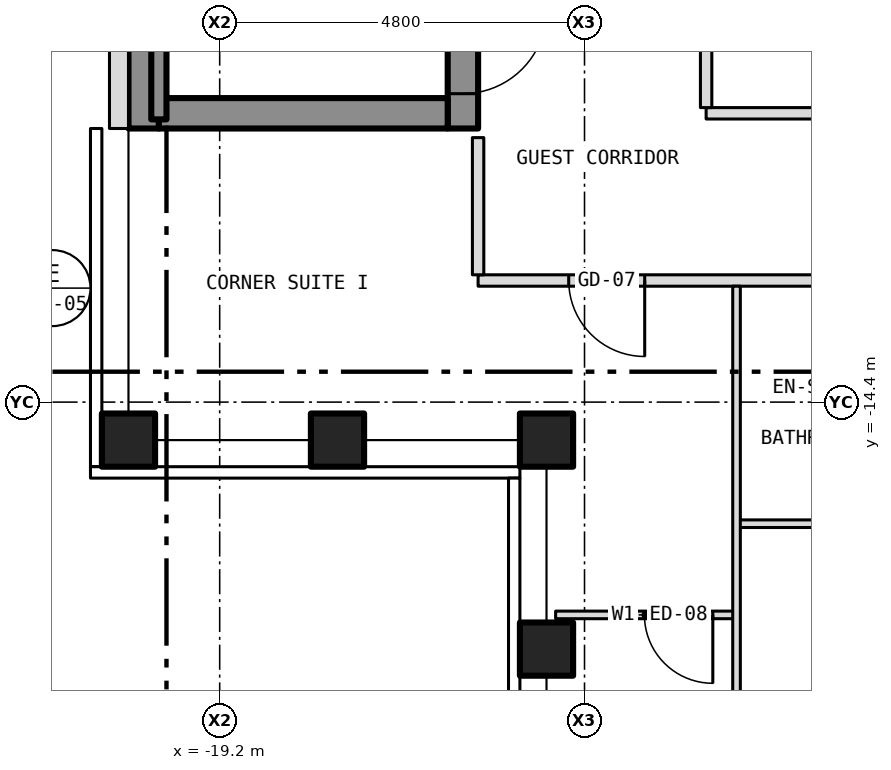
"""IFC4 building model, lengths in metres.
Left out: names, types, materials, properties, quantities, classifications, styles, units other than length and angle.
Written with IfcOpenShell. Run it as: python <this file> out.ifc"""

import sys

from ifc_helpers import new_model, si_unit, direction, frame, frame_2d, origin, origin_2d, place, context, subcontext, project, spatial, rectangle, hollow_rectangle, extrude, element, fill, save


model = new_model("IFC4")
c1 = context("Model", 3, precision=1e-05, world=origin(), true_north=direction((0.0, 1.0)))
c2 = subcontext(c1, "Body", "Model", "MODEL_VIEW")
j1 = project(units=[si_unit("LENGTHUNIT", "METRE"), si_unit("PLANEANGLEUNIT", "RADIAN")], contexts=[c1])
p1 = place(None, origin())
s1 = spatial("IfcSite", under=j1, at=p1, CompositionType="ELEMENT")
p2 = place(p1, origin())
s2 = spatial("IfcBuilding", under=s1, at=p2, CompositionType="ELEMENT")
p3 = place(p2, frame((0.0, 0.0, 215.5)))
s3 = spatial("IfcBuildingStorey", under=s2, at=p3, CompositionType="ELEMENT", Elevation=215.5)
for number, where, z_axis, x_axis in (
    (1, (-20.4, -14.9, -0.15), (0.0, 0.0, 1.0), (1.0, 0.0, 0.0)),
    (2, (-14.9, -14.9, -0.15), (0.0, 0.0, 1.0), (1.0, 0.0, 0.0)),
    (3, (-14.9, -17.65, -0.15), (0.0, 0.0, 1.0), (1.0, 0.0, 0.0)),
    (4, (-17.65, -14.9, -0.15), (0.0, 0.0, 1.0), (1.0, 0.0, 0.0)),
):
    element("IfcColumn", number, at=place(p3, frame(where, z_axis=z_axis, x_axis=x_axis)), inside=s3, PredefinedType="COLUMN", context=c2, shape_type="SweptSolid", body=[
        extrude(hollow_rectangle(XDim=0.7, YDim=0.7, WallThickness=0.04, at=origin_2d()), origin(), (0.0, 0.0, 1.0), 3.5),
    ])
p4 = place(p3, frame((-16.0, -10.8, 0.0), z_axis=(0.0, 0.0, 1.0), x_axis=(0.0, 1.0, 0.0)))
e5 = element("IfcWall", 5, at=p4, inside=s3, PredefinedType="SHEAR", context=c2, shape_type="SweptSolid", body=[
    extrude(rectangle(XDim=21.6, YDim=0.4, at=frame_2d((10.8, 0.0))), origin(), (0.0, 0.0, 1.0), 3.25),
])
p5 = place(p4, frame((9.4, 0.0, 0.0)))
e6 = element("IfcOpeningElement", 6, at=p5, cuts=e5, PredefinedType="OPENING", context=c2, shape_type="SweptSolid", body=[
    extrude(rectangle(XDim=1.1, YDim=2.1, at=frame_2d((0.55, 1.05))), frame((0.0, 0.212, 0.0), z_axis=(0.0, -1.0, 0.0), x_axis=(1.0, 0.0, 0.0)), (0.0, 0.0, 1.0), 0.424),
])
p6 = place(p4, frame((11.5, 0.0, 0.0)))
e7 = element("IfcOpeningElement", 7, at=p6, cuts=e5, PredefinedType="OPENING", context=c2, shape_type="SweptSolid", body=[
    extrude(rectangle(XDim=1.1, YDim=2.1, at=frame_2d((0.55, 1.05))), frame((0.0, 0.212, 0.0), z_axis=(0.0, -1.0, 0.0), x_axis=(1.0, 0.0, 0.0)), (0.0, 0.0, 1.0), 0.424),
])
p7 = place(p4, frame((13.6, 0.0, 0.0)))
e8 = element("IfcOpeningElement", 8, at=p7, cuts=e5, PredefinedType="OPENING", context=c2, shape_type="SweptSolid", body=[
    extrude(rectangle(XDim=1.1, YDim=2.1, at=frame_2d((0.55, 1.05))), frame((0.0, 0.212, 0.0), z_axis=(0.0, -1.0, 0.0), x_axis=(1.0, 0.0, 0.0)), (0.0, 0.0, 1.0), 0.424),
])
p8 = place(p4, frame((15.7, 0.0, 0.0)))
e9 = element("IfcOpeningElement", 9, at=p8, cuts=e5, PredefinedType="OPENING", context=c2, shape_type="SweptSolid", body=[
    extrude(rectangle(XDim=1.1, YDim=2.1, at=frame_2d((0.55, 1.05))), frame((0.0, 0.212, 0.0), z_axis=(0.0, -1.0, 0.0), x_axis=(1.0, 0.0, 0.0)), (0.0, 0.0, 1.0), 0.424),
])
p9 = place(p4, frame((17.8, 0.0, 0.0)))
e10 = element("IfcOpeningElement", 10, at=p9, cuts=e5, PredefinedType="OPENING", context=c2, shape_type="SweptSolid", body=[
    extrude(rectangle(XDim=1.1, YDim=2.1, at=frame_2d((0.55, 1.05))), frame((0.0, 0.212, 0.0), z_axis=(0.0, -1.0, 0.0), x_axis=(1.0, 0.0, 0.0)), (0.0, 0.0, 1.0), 0.424),
])
p10 = place(p4, frame((0.458, 0.0, 0.0)))
e11 = element("IfcOpeningElement", 11, at=p10, cuts=e5, PredefinedType="OPENING", context=c2, shape_type="SweptSolid", body=[
    extrude(rectangle(XDim=1.1, YDim=2.1, at=frame_2d((0.55, 1.05))), frame((0.0, 0.212, 0.0), z_axis=(0.0, -1.0, 0.0), x_axis=(1.0, 0.0, 0.0)), (0.0, 0.0, 1.0), 0.424),
])
p11 = place(p4, frame((7.5, 0.0, 0.0)))
e12 = element("IfcOpeningElement", 12, at=p11, cuts=e5, PredefinedType="OPENING", context=c2, shape_type="SweptSolid", body=[
    extrude(rectangle(XDim=1.1, YDim=2.1, at=frame_2d((0.55, 1.05))), frame((0.0, 0.212, 0.0), z_axis=(0.0, -1.0, 0.0), x_axis=(1.0, 0.0, 0.0)), (0.0, 0.0, 1.0), 0.424),
])
p12 = place(p4, frame((20.0, 0.0, 0.0)))
e13 = element("IfcOpeningElement", 13, at=p12, cuts=e5, PredefinedType="OPENING", context=c2, shape_type="SweptSolid", body=[
    extrude(rectangle(XDim=0.9, YDim=2.1, at=frame_2d((0.45, 1.05))), frame((0.0, 0.212, 0.0), z_axis=(0.0, -1.0, 0.0), x_axis=(1.0, 0.0, 0.0)), (0.0, 0.0, 1.0), 0.424),
])
p13 = place(p3, frame((-20.2, -10.8, 0.0), z_axis=(0.0, 0.0, 1.0), x_axis=(0.0, 1.0, 0.0)))
e14 = element("IfcWall", 14, at=p13, inside=s3, PredefinedType="SHEAR", context=c2, shape_type="SweptSolid", body=[
    extrude(rectangle(XDim=21.6, YDim=0.4, at=frame_2d((10.8, 0.0))), origin(), (0.0, 0.0, 1.0), 3.25),
])
p14 = place(p3, frame((-20.0, -10.6, 0.0), z_axis=(0.0, 0.0, 1.0), x_axis=(1.0, 0.0, 0.0)))
e15 = element("IfcWall", 15, at=p14, inside=s3, PredefinedType="SHEAR", context=c2, shape_type="SweptSolid", body=[
    extrude(rectangle(XDim=3.8, YDim=0.4, at=frame_2d((1.9, 0.0))), origin(), (0.0, 0.0, 1.0), 3.25),
])
p15 = place(p3, frame((-20.525, 10.8, 0.0), z_axis=(0.0, 0.0, 1.0), x_axis=(0.0, -1.0, 0.0)))
e16 = element("IfcWall", 16, at=p15, inside=s3, PredefinedType="SOLIDWALL", context=c2, shape_type="SweptSolid", body=[
    extrude(rectangle(XDim=21.6, YDim=0.25, at=frame_2d((10.8, 0.0))), origin(), (0.0, 0.0, 1.0), 3.5),
])
p16 = place(p15, frame((18.05, 0.0, 1.0)))
e17 = element("IfcOpeningElement", 17, at=p16, cuts=e16, PredefinedType="OPENING", context=c2, shape_type="SweptSolid", body=[
    extrude(rectangle(XDim=0.6, YDim=1.5, at=frame_2d((0.3, 0.75))), frame((0.0, 0.137, 0.0), z_axis=(0.0, -1.0, 0.0), x_axis=(1.0, 0.0, 0.0)), (0.0, 0.0, 1.0), 0.274),
])
p17 = place(p3, frame((-14.78, -17.2, 0.0), z_axis=(0.0, 0.0, 1.0), x_axis=(1.0, 0.0, 0.0)))
e18 = element("IfcWall", 18, at=p17, inside=s3, PredefinedType="PARTITIONING", context=c2, shape_type="SweptSolid", body=[
    extrude(rectangle(XDim=2.38, YDim=0.1, at=frame_2d((1.19, 0.0))), origin(), (0.0, 0.0, 1.0), 3.35),
])
p18 = place(p17, frame((1.168, 0.0, 0.0)))
e19 = element("IfcOpeningElement", 19, at=p18, cuts=e18, PredefinedType="OPENING", context=c2, shape_type="SweptSolid", body=[
    extrude(rectangle(XDim=0.9, YDim=2.1, at=frame_2d((0.45, 1.05))), frame((0.0, 0.062, 0.0), z_axis=(0.0, -1.0, 0.0), x_axis=(1.0, 0.0, 0.0)), (0.0, 0.0, 1.0), 0.124),
])
p19 = place(p3, frame((-12.4, -16.0, 0.0), z_axis=(0.0, 0.0, 1.0), x_axis=(1.0, 0.0, 0.0)))
e20 = element("IfcWall", 20, at=p19, inside=s3, PredefinedType="PARTITIONING", context=c2, shape_type="SweptSolid", body=[
    extrude(rectangle(XDim=2.2, YDim=0.1, at=frame_2d((1.1, 0.0))), origin(), (0.0, 0.0, 1.0), 3.35),
])
p20 = place(p3, frame((-15.8, -12.8, 0.0), z_axis=(0.0, 0.0, 1.0), x_axis=(1.0, 0.0, 0.0)))
e21 = element("IfcWall", 21, at=p20, inside=s3, PredefinedType="PARTITIONING", context=c2, shape_type="SweptSolid", body=[
    extrude(rectangle(XDim=31.6, YDim=0.15, at=frame_2d((15.8, 0.0))), origin(), (0.0, 0.0, 1.0), 3.35),
])
p21 = place(p20, frame((6.466, 0.0, 0.0)))
e22 = element("IfcOpeningElement", 22, at=p21, cuts=e21, PredefinedType="OPENING", context=c2, shape_type="SweptSolid", body=[
    extrude(rectangle(XDim=1.0, YDim=2.1, at=frame_2d((0.5, 1.05))), frame((0.0, 0.087, 0.0), z_axis=(0.0, -1.0, 0.0), x_axis=(1.0, 0.0, 0.0)), (0.0, 0.0, 1.0), 0.174),
])
p22 = place(p20, frame((15.548, 0.0, 0.0)))
e23 = element("IfcOpeningElement", 23, at=p22, cuts=e21, PredefinedType="OPENING", context=c2, shape_type="SweptSolid", body=[
    extrude(rectangle(XDim=1.0, YDim=2.1, at=frame_2d((0.5, 1.05))), frame((0.0, 0.087, 0.0), z_axis=(0.0, -1.0, 0.0), x_axis=(1.0, 0.0, 0.0)), (0.0, 0.0, 1.0), 0.174),
])
p23 = place(p20, frame((20.018, 0.0, 0.0)))
e24 = element("IfcOpeningElement", 24, at=p23, cuts=e21, PredefinedType="OPENING", context=c2, shape_type="SweptSolid", body=[
    extrude(rectangle(XDim=1.0, YDim=2.1, at=frame_2d((0.5, 1.05))), frame((0.0, 0.087, 0.0), z_axis=(0.0, -1.0, 0.0), x_axis=(1.0, 0.0, 0.0)), (0.0, 0.0, 1.0), 0.174),
])
p24 = place(p20, frame((1.192, 0.0, 0.0)))
e25 = element("IfcOpeningElement", 25, at=p24, cuts=e21, PredefinedType="OPENING", context=c2, shape_type="SweptSolid", body=[
    extrude(rectangle(XDim=1.0, YDim=2.1, at=frame_2d((0.5, 1.05))), frame((0.0, 0.087, 0.0), z_axis=(0.0, -1.0, 0.0), x_axis=(1.0, 0.0, 0.0)), (0.0, 0.0, 1.0), 0.174),
])
p25 = place(p20, frame((29.409, 0.0, 0.0)))
e26 = element("IfcOpeningElement", 26, at=p25, cuts=e21, PredefinedType="OPENING", context=c2, shape_type="SweptSolid", body=[
    extrude(rectangle(XDim=1.0, YDim=2.1, at=frame_2d((0.5, 1.05))), frame((0.0, 0.087, 0.0), z_axis=(0.0, -1.0, 0.0), x_axis=(1.0, 0.0, 0.0)), (0.0, 0.0, 1.0), 0.174),
])
p26 = place(p3, frame((-12.8, -10.6, 0.0), z_axis=(0.0, 0.0, 1.0), x_axis=(1.0, 0.0, 0.0)))
e27 = element("IfcWall", 27, at=p26, inside=s3, PredefinedType="PARTITIONING", context=c2, shape_type="SweptSolid", body=[
    extrude(rectangle(XDim=13.9, YDim=0.15, at=frame_2d((6.95, 0.0))), origin(), (0.0, 0.0, 1.0), 3.35),
])
p27 = place(p3, frame((-20.0, -10.68, 0.0), z_axis=(0.0, 0.0, 1.0), x_axis=(0.0, 1.0, 0.0)))
e28 = element("IfcWall", 28, at=p27, inside=s3, PredefinedType="SHEAR", context=c2, shape_type="SweptSolid", body=[
    extrude(rectangle(XDim=6.98, YDim=0.2, at=frame_2d((3.49, 0.0))), origin(), (0.0, 0.0, 1.0), 3.25),
])
p28 = place(p3, frame((-15.8, -12.725, 0.0), z_axis=(0.0, 0.0, 1.0), x_axis=(0.0, 1.0, 0.0)))
e29 = element("IfcWall", 29, at=p28, inside=s3, PredefinedType="PARTITIONING", context=c2, shape_type="SweptSolid", body=[
    extrude(rectangle(XDim=1.805, YDim=0.15, at=frame_2d((0.903, 0.0))), origin(), (0.0, 0.0, 1.0), 3.35),
])
p29 = place(p3, frame((-12.8, -10.525, 0.0), z_axis=(0.0, 0.0, 1.0), x_axis=(0.0, 1.0, 0.0)))
e30 = element("IfcWall", 30, at=p29, inside=s3, PredefinedType="PARTITIONING", context=c2, shape_type="SweptSolid", body=[
    extrude(rectangle(XDim=8.525, YDim=0.15, at=frame_2d((4.262, 0.0))), origin(), (0.0, 0.0, 1.0), 3.35),
])
p30 = place(p29, frame((3.825, 0.0, 0.0)))
e31 = element("IfcOpeningElement", 31, at=p30, cuts=e30, PredefinedType="OPENING", context=c2, shape_type="SweptSolid", body=[
    extrude(rectangle(XDim=0.9, YDim=2.1, at=frame_2d((0.45, 1.05))), frame((0.0, 0.087, 0.0), z_axis=(0.0, -1.0, 0.0), x_axis=(1.0, 0.0, 0.0)), (0.0, 0.0, 1.0), 0.174),
])
p31 = place(p3, frame((-12.4, -20.78, 0.0), z_axis=(0.0, 0.0, 1.0), x_axis=(0.0, 1.0, 0.0)))
e32 = element("IfcWall", 32, at=p31, inside=s3, PredefinedType="PARTITIONING", context=c2, shape_type="SweptSolid", body=[
    extrude(rectangle(XDim=7.905, YDim=0.1, at=frame_2d((3.953, 0.0))), origin(), (0.0, 0.0, 1.0), 3.35),
])
p32 = place(p10, origin())
e33 = element("IfcDoor", 33, at=p32, inside=s3, OperationType="SINGLE_SWING_RIGHT", PredefinedType="DOOR", context=c2, shape_type="SweptSolid", body=[
    extrude(rectangle(XDim=1.1, YDim=2.1, at=frame_2d((0.55, 1.05))), frame((0.0, 0.025, 0.0), z_axis=(0.0, -1.0, 0.0), x_axis=(1.0, 0.0, 0.0)), (0.0, 0.0, 1.0), 0.05),
])
fill(e11, e33)
p33 = place(p18, origin())
e34 = element("IfcDoor", 34, at=p33, inside=s3, OperationType="SINGLE_SWING_RIGHT", PredefinedType="DOOR", context=c2, shape_type="SweptSolid", body=[
    extrude(rectangle(XDim=0.9, YDim=2.1, at=frame_2d((0.45, 1.05))), frame((0.0, 0.025, 0.0), z_axis=(0.0, -1.0, 0.0), x_axis=(1.0, 0.0, 0.0)), (0.0, 0.0, 1.0), 0.05),
])
fill(e19, e34)
p34 = place(p24, origin())
e35 = element("IfcDoor", 35, at=p34, inside=s3, OperationType="SINGLE_SWING_RIGHT", PredefinedType="DOOR", context=c2, shape_type="SweptSolid", body=[
    extrude(rectangle(XDim=1.0, YDim=2.1, at=frame_2d((0.5, 1.05))), frame((0.0, 0.025, 0.0), z_axis=(0.0, -1.0, 0.0), x_axis=(1.0, 0.0, 0.0)), (0.0, 0.0, 1.0), 0.05),
])
fill(e25, e35)
save(model, sys.argv[1])
